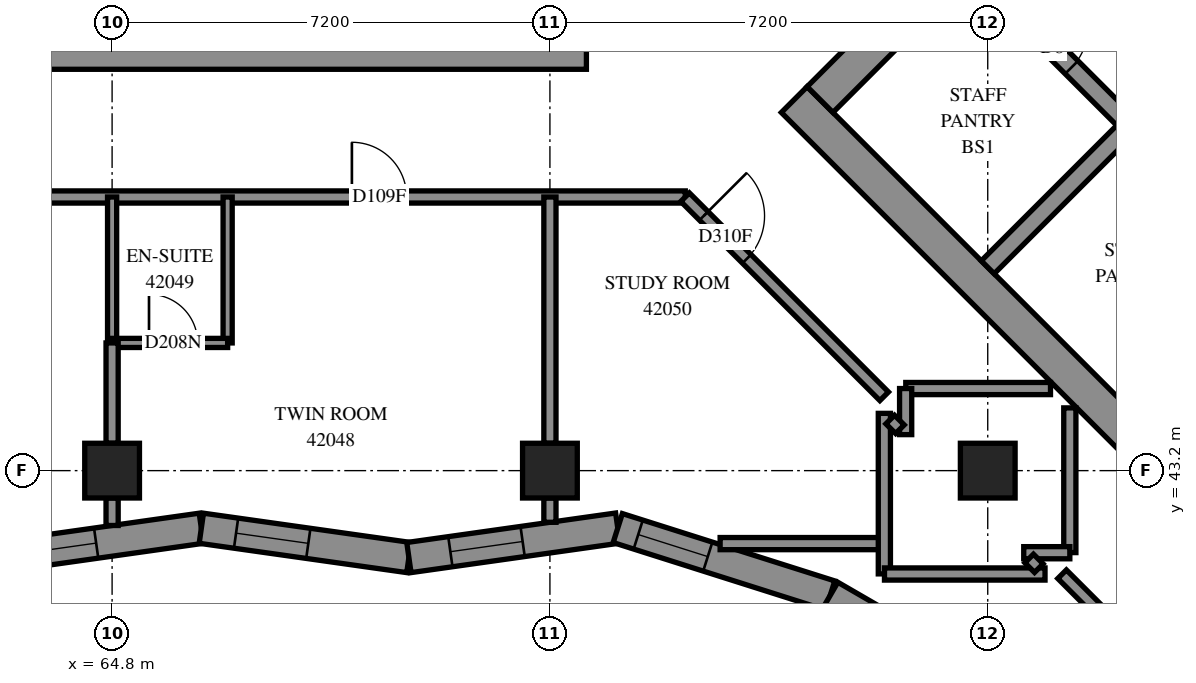
"""IFC4 building model, lengths in metres.
Left out: names, types, materials, properties, quantities, classifications, styles, units other than length and angle.
Written with IfcOpenShell. Run it as: python <this file> out.ifc"""

import sys

from ifc_helpers import new_model, si_unit, direction, frame, frame_2d, origin, origin_2d, place, context, subcontext, project, spatial, polyline, rectangle, outline, extrude, element, fill, save


model = new_model("IFC4")
c1 = context("Model", 3, precision=1e-05, world=origin(), true_north=direction((0.0, 1.0)))
c2 = subcontext(c1, "Body", "Model", "MODEL_VIEW")
j1 = project(units=[si_unit("LENGTHUNIT", "METRE"), si_unit("PLANEANGLEUNIT", "RADIAN")], contexts=[c1])
p1 = place(None, origin())
s1 = spatial("IfcSite", under=j1, at=p1, CompositionType="ELEMENT")
p2 = place(p1, origin())
s2 = spatial("IfcBuilding", under=s1, at=p2, CompositionType="ELEMENT")
p3 = place(p2, frame((0.0, 0.0, 155.8)))
s3 = spatial("IfcBuildingStorey", under=s2, at=p3, CompositionType="ELEMENT", Elevation=155.8)
for number, where, z_axis, x_axis in (
    (1, (64.8, 43.2, 0.0), (0.0, 0.0, 1.0), (1.0, 0.0, 0.0)),
    (2, (72.0, 43.2, 0.0), (0.0, 0.0, 1.0), (1.0, 0.0, 0.0)),
    (3, (79.2, 43.2, 0.0), (0.0, 0.0, 1.0), (1.0, 0.0, 0.0)),
):
    element("IfcColumn", number, at=place(p3, frame(where, z_axis=z_axis, x_axis=x_axis)), inside=s3, PredefinedType="COLUMN", context=c2, shape_type="SweptSolid", body=[
        extrude(rectangle(XDim=0.9, YDim=0.9, at=origin_2d()), origin(), (0.0, 0.0, 1.0), 3.1),
    ])
for number, where, z_axis, x_axis in (
    (4, (57.0, 50.1, -0.3), (0.0, 0.0, 1.0), (1.0, 0.0, 0.0)),
    (5, (76.018, 49.302, -0.3), (0.0, 0.0, 1.0), (0.707, -0.707, 0.0)),
):
    element("IfcWall", number, at=place(p3, frame(where, z_axis=z_axis, x_axis=x_axis)), inside=s3, PredefinedType="SHEAR", context=c2, shape_type="SweptSolid", body=[
        extrude(rectangle(XDim=15.6, YDim=0.6, at=frame_2d((7.8, 0.0))), origin(), (0.0, 0.0, 1.0), 2.7),
    ])
p4 = place(p3, frame((76.442, 49.302, -0.3), z_axis=(0.0, 0.0, 1.0), x_axis=(0.7071067812, 0.7071067812, 0.0)))
e6 = element("IfcWall", 6, at=p4, inside=s3, PredefinedType="SHEAR", context=c2, shape_type="SweptSolid", body=[
    extrude(rectangle(XDim=14.4, YDim=0.6, at=frame_2d((7.2, 0.0))), origin(), (0.0, 0.0, 1.0), 2.7),
])
p5 = place(p4, frame((4.55, 0.0, 0.3)))
e7 = element("IfcOpeningElement", 7, at=p5, cuts=e6, PredefinedType="OPENING", context=c2, shape_type="SweptSolid", body=[
    extrude(rectangle(XDim=1.1, YDim=2.1, at=frame_2d((0.55, 1.05))), frame((0.0, 0.31, 0.0), z_axis=(0.0, -1.0, 0.0), x_axis=(1.0, 0.0, 0.0)), (0.0, 0.0, 1.0), 0.62),
])
p6 = place(p4, frame((11.35, 0.0, 0.3)))
e8 = element("IfcOpeningElement", 8, at=p6, cuts=e6, PredefinedType="OPENING", context=c2, shape_type="SweptSolid", body=[
    extrude(rectangle(XDim=1.1, YDim=2.1, at=frame_2d((0.55, 1.05))), frame((0.0, 0.31, 0.0), z_axis=(0.0, -1.0, 0.0), x_axis=(1.0, 0.0, 0.0)), (0.0, 0.0, 1.0), 0.62),
])
p7 = place(p3, frame((79.2, 46.544, 0.0), z_axis=(0.0, 0.0, 1.0), x_axis=(0.7071219326, 0.7070916295, 0.0)))
e9 = element("IfcWall", 9, at=p7, inside=s3, PredefinedType="SOLIDWALL", context=c2, shape_type="SweptSolid", body=[
    extrude(rectangle(XDim=3.3, YDim=0.3, at=frame_2d((1.65, 0.0))), origin(), (0.0, 0.0, 1.0), 3.1),
])
p8 = place(p3, frame((78.988, 51.423, 0.0), z_axis=(0.0, 0.0, 1.0), x_axis=(0.7071067812, -0.7071067812, 0.0)))
e10 = element("IfcWall", 10, at=p8, inside=s3, PredefinedType="SOLIDWALL", context=c2, shape_type="SweptSolid", body=[
    extrude(rectangle(XDim=14.4, YDim=0.3, at=frame_2d((7.2, 0.0))), origin(), (0.0, 0.0, 1.0), 3.1),
])
p9 = place(p8, frame((1.35, 0.0, 0.0)))
e11 = element("IfcOpeningElement", 11, at=p9, cuts=e10, PredefinedType="OPENING", context=c2, shape_type="SweptSolid", body=[
    extrude(rectangle(XDim=0.9, YDim=2.1, at=frame_2d((0.45, 1.05))), frame((0.0, 0.16, 0.0), z_axis=(0.0, -1.0, 0.0), x_axis=(1.0, 0.0, 0.0)), (0.0, 0.0, 1.0), 0.32),
])
p10 = place(p8, frame((4.95, 0.0, 0.0)))
e12 = element("IfcOpeningElement", 12, at=p10, cuts=e10, PredefinedType="OPENING", context=c2, shape_type="SweptSolid", body=[
    extrude(rectangle(XDim=0.9, YDim=2.1, at=frame_2d((0.45, 1.05))), frame((0.0, 0.16, 0.0), z_axis=(0.0, -1.0, 0.0), x_axis=(1.0, 0.0, 0.0)), (0.0, 0.0, 1.0), 0.32),
])
p11 = place(p8, frame((8.55, 0.0, 0.0)))
e13 = element("IfcOpeningElement", 13, at=p11, cuts=e10, PredefinedType="OPENING", context=c2, shape_type="SweptSolid", body=[
    extrude(rectangle(XDim=0.9, YDim=2.1, at=frame_2d((0.45, 1.05))), frame((0.0, 0.16, 0.0), z_axis=(0.0, -1.0, 0.0), x_axis=(1.0, 0.0, 0.0)), (0.0, 0.0, 1.0), 0.32),
])
p12 = place(p8, frame((12.05, 0.0, 0.0)))
e14 = element("IfcOpeningElement", 14, at=p12, cuts=e10, PredefinedType="OPENING", context=c2, shape_type="SweptSolid", body=[
    extrude(rectangle(XDim=1.1, YDim=2.1, at=frame_2d((0.55, 1.05))), frame((0.0, 0.16, 0.0), z_axis=(0.0, -1.0, 0.0), x_axis=(1.0, 0.0, 0.0)), (0.0, 0.0, 1.0), 0.32),
])
p13 = place(p3, frame((62.854, 41.77, 0.0), z_axis=(0.0, 0.0, 1.0), x_axis=(0.9901767876, 0.1398210616, 0.0)))
e15 = element("IfcWall", 15, at=p13, inside=s3, PredefinedType="SOLIDWALL", context=c2, shape_type="SweptSolid", body=[
    extrude(outline(polyline([(-0.035, -0.25), (3.412, -0.25), (3.483, 0.25), (0.035, 0.25), (-0.035, -0.25)])), origin(), (0.0, 0.0, 1.0), 3.1),
])
p14 = place(p13, frame((0.5, 0.0, 0.45)))
e16 = element("IfcOpeningElement", 16, at=p14, cuts=e15, PredefinedType="OPENING", context=c2, shape_type="SweptSolid", body=[
    extrude(rectangle(XDim=1.2, YDim=2.5, at=frame_2d((0.6, 1.25))), frame((0.0, 0.26, 0.0), z_axis=(0.0, -1.0, 0.0), x_axis=(1.0, 0.0, 0.0)), (0.0, 0.0, 1.0), 0.52),
])
p15 = place(p3, frame((66.267, 42.252, 0.0), z_axis=(0.0, 0.0, 1.0), x_axis=(0.9901773547, -0.1398170455, 0.0)))
e17 = element("IfcWall", 17, at=p15, inside=s3, PredefinedType="SOLIDWALL", context=c2, shape_type="SweptSolid", body=[
    extrude(outline(polyline([(0.035, -0.25), (3.483, -0.25), (3.412, 0.25), (-0.035, 0.25), (0.035, -0.25)])), origin(), (0.0, 0.0, 1.0), 3.1),
])
p16 = place(p15, frame((0.577, 0.0, 0.45)))
e18 = element("IfcOpeningElement", 18, at=p16, cuts=e17, PredefinedType="OPENING", context=c2, shape_type="SweptSolid", body=[
    extrude(rectangle(XDim=1.2, YDim=2.5, at=frame_2d((0.6, 1.25))), frame((0.0, 0.26, 0.0), z_axis=(0.0, -1.0, 0.0), x_axis=(1.0, 0.0, 0.0)), (0.0, 0.0, 1.0), 0.52),
])
p17 = place(p3, frame((69.681, 41.77, 0.0), z_axis=(0.0, 0.0, 1.0), x_axis=(0.9901776599, 0.1398148844, 0.0)))
e19 = element("IfcWall", 19, at=p17, inside=s3, PredefinedType="SOLIDWALL", context=c2, shape_type="SweptSolid", body=[
    extrude(outline(polyline([(-0.035, -0.25), (3.412, -0.25), (3.526, 0.25), (0.035, 0.25), (-0.035, -0.25)])), origin(), (0.0, 0.0, 1.0), 3.1),
])
p18 = place(p17, frame((0.689, 0.0, 0.45)))
e20 = element("IfcOpeningElement", 20, at=p18, cuts=e19, PredefinedType="OPENING", context=c2, shape_type="SweptSolid", body=[
    extrude(rectangle(XDim=1.2, YDim=2.5, at=frame_2d((0.6, 1.25))), frame((0.0, 0.26, 0.0), z_axis=(0.0, -1.0, 0.0), x_axis=(1.0, 0.0, 0.0)), (0.0, 0.0, 1.0), 0.52),
])
p19 = place(p3, frame((73.116, 42.255, 0.0), z_axis=(0.0, 0.0, 1.0), x_axis=(0.9532588183, -0.3021549691, 0.0)))
e21 = element("IfcWall", 21, at=p19, inside=s3, PredefinedType="SOLIDWALL", context=c2, shape_type="SweptSolid", body=[
    extrude(outline(polyline([(0.057, -0.25), (3.638, -0.25), (3.692, 0.25), (-0.057, 0.25), (0.057, -0.25)])), origin(), (0.0, 0.0, 1.0), 3.1),
])
p20 = place(p19, frame((0.353, 0.0, 0.45)))
e22 = element("IfcOpeningElement", 22, at=p20, cuts=e21, PredefinedType="OPENING", context=c2, shape_type="SweptSolid", body=[
    extrude(rectangle(XDim=1.2, YDim=2.5, at=frame_2d((0.6, 1.25))), frame((0.0, 0.26, 0.0), z_axis=(0.0, -1.0, 0.0), x_axis=(1.0, 0.0, 0.0)), (0.0, 0.0, 1.0), 0.52),
])
p21 = place(p3, frame((76.609, 41.148, 0.0), z_axis=(0.0, 0.0, 1.0), x_axis=(0.8655245779, -0.5008664544, 0.0)))
e23 = element("IfcWall", 23, at=p21, inside=s3, PredefinedType="SOLIDWALL", context=c2, shape_type="SweptSolid", body=[
    extrude(outline(polyline([(0.027, -0.25), (4.223, -0.25), (4.319, 0.25), (-0.027, 0.25), (0.027, -0.25)])), origin(), (0.0, 0.0, 1.0), 3.1),
])
p22 = place(p21, frame((0.736, 0.0, 0.45)))
e24 = element("IfcOpeningElement", 24, at=p22, cuts=e23, PredefinedType="OPENING", context=c2, shape_type="SweptSolid", body=[
    extrude(rectangle(XDim=1.2, YDim=2.5, at=frame_2d((0.6, 1.25))), frame((0.0, 0.26, 0.0), z_axis=(0.0, -1.0, 0.0), x_axis=(1.0, 0.0, 0.0)), (0.0, 0.0, 1.0), 0.52),
])
p23 = place(p21, frame((2.272, 0.0, 0.45)))
e25 = element("IfcOpeningElement", 25, at=p23, cuts=e23, PredefinedType="OPENING", context=c2, shape_type="SweptSolid", body=[
    extrude(rectangle(XDim=1.2, YDim=2.5, at=frame_2d((0.6, 1.25))), frame((0.0, 0.26, 0.0), z_axis=(0.0, -1.0, 0.0), x_axis=(1.0, 0.0, 0.0)), (0.0, 0.0, 1.0), 0.52),
])
p24 = place(p3, frame((54.9, 47.7, 0.0), z_axis=(0.0, 0.0, 1.0), x_axis=(1.0, 0.0, 0.0)))
e26 = element("IfcWall", 26, at=p24, inside=s3, PredefinedType="PARTITIONING", context=c2, shape_type="SweptSolid", body=[
    extrude(rectangle(XDim=19.326, YDim=0.2, at=frame_2d((9.663, 0.0))), origin(), (0.0, 0.0, 1.0), 3.1),
])
p25 = place(p24, frame((6.643, 0.0, 0.0)))
e27 = element("IfcOpeningElement", 27, at=p25, cuts=e26, PredefinedType="OPENING", context=c2, shape_type="SweptSolid", body=[
    extrude(rectangle(XDim=0.9, YDim=2.1, at=frame_2d((0.45, 1.05))), frame((0.0, 0.11, 0.0), z_axis=(0.0, -1.0, 0.0), x_axis=(1.0, 0.0, 0.0)), (0.0, 0.0, 1.0), 0.22),
])
p26 = place(p24, frame((13.843, 0.0, 0.0)))
e28 = element("IfcOpeningElement", 28, at=p26, cuts=e26, PredefinedType="OPENING", context=c2, shape_type="SweptSolid", body=[
    extrude(rectangle(XDim=0.9, YDim=2.1, at=frame_2d((0.45, 1.05))), frame((0.0, 0.11, 0.0), z_axis=(0.0, -1.0, 0.0), x_axis=(1.0, 0.0, 0.0)), (0.0, 0.0, 1.0), 0.22),
])
p27 = place(p3, frame((80.423, 41.497, 0.0), z_axis=(0.0, 0.0, 1.0), x_axis=(0.7071067812, -0.7071067812, 0.0)))
e29 = element("IfcWall", 29, at=p27, inside=s3, PredefinedType="PARTITIONING", context=c2, shape_type="SweptSolid", body=[
    extrude(rectangle(XDim=9.065, YDim=0.2, at=frame_2d((4.532, 0.0))), origin(), (0.0, 0.0, 1.0), 3.1),
])
p28 = place(p3, frame((74.223, 47.697, 0.0), z_axis=(0.0, 0.0, 1.0), x_axis=(0.7071067812, -0.7071067812, 0.0)))
e30 = element("IfcWall", 30, at=p28, inside=s3, PredefinedType="PARTITIONING", context=c2, shape_type="SweptSolid", body=[
    extrude(rectangle(XDim=4.63, YDim=0.2, at=frame_2d((2.315, 0.0))), origin(), (0.0, 0.0, 1.0), 3.1),
])
p29 = place(p28, frame((0.434, 0.0, 0.0)))
e31 = element("IfcOpeningElement", 31, at=p29, cuts=e30, PredefinedType="OPENING", context=c2, shape_type="SweptSolid", body=[
    extrude(rectangle(XDim=1.0, YDim=2.1, at=frame_2d((0.5, 1.05))), frame((0.0, 0.11, 0.0), z_axis=(0.0, -1.0, 0.0), x_axis=(1.0, 0.0, 0.0)), (0.0, 0.0, 1.0), 0.22),
])
p30 = place(p3, frame((72.0, 43.65, 0.0), z_axis=(0.0, 0.0, 1.0), x_axis=(0.0, 1.0, 0.0)))
e32 = element("IfcWall", 32, at=p30, inside=s3, PredefinedType="PARTITIONING", context=c2, shape_type="SweptSolid", body=[
    extrude(rectangle(XDim=4.05, YDim=0.2, at=frame_2d((2.025, 0.0))), origin(), (0.0, 0.0, 1.0), 3.1),
])
p31 = place(p3, frame((74.799, 42.0, 0.0), z_axis=(0.0, 0.0, 1.0), x_axis=(1.0, 0.0, 0.0)))
e33 = element("IfcWall", 33, at=p31, inside=s3, PredefinedType="PARTITIONING", context=c2, shape_type="SweptSolid", body=[
    extrude(rectangle(XDim=2.701, YDim=0.2, at=frame_2d((1.351, 0.0))), origin(), (0.0, 0.0, 1.0), 3.1),
])
for number, where, z_axis, x_axis in (
    (34, (77.5, 41.502, 0.0), (0.0, 0.0, 1.0), (0.0, 1.0, 0.0)),
    (35, (77.502, 41.5, 0.0), (0.0, 0.0, 1.0), (1.0, 0.0, 0.0)),
):
    element("IfcWall", number, at=place(p3, frame(where, z_axis=z_axis, x_axis=x_axis)), inside=s3, PredefinedType="PARTITIONING", context=c2, shape_type="SweptSolid", body=[
        extrude(rectangle(XDim=2.64, YDim=0.2, at=frame_2d((1.32, 0.0))), origin(), (0.0, 0.0, 1.0), 3.1),
    ])
for number, where, z_axis, x_axis in (
    (36, (66.7, 45.3, 0.0), (0.0, 0.0, 1.0), (0.0, 1.0, 0.0)),
    (37, (64.8, 45.3, 0.0), (0.0, 0.0, 1.0), (0.0, 1.0, 0.0)),
):
    element("IfcWall", number, at=place(p3, frame(where, z_axis=z_axis, x_axis=x_axis)), inside=s3, PredefinedType="PARTITIONING", context=c2, shape_type="SweptSolid", body=[
        extrude(rectangle(XDim=2.4, YDim=0.15, at=frame_2d((1.2, 0.0))), origin(), (0.0, 0.0, 1.0), 3.1),
    ])
for number, where, z_axis, x_axis in (
    (38, (80.55, 41.852, 0.0), (0.0, 0.0, 1.0), (0.0, 1.0, 0.0)),
    (39, (77.852, 44.55, 0.0), (0.0, 0.0, 1.0), (1.0, 0.0, 0.0)),
):
    element("IfcWall", number, at=place(p3, frame(where, z_axis=z_axis, x_axis=x_axis)), inside=s3, PredefinedType="PARTITIONING", context=c2, shape_type="SweptSolid", body=[
        extrude(rectangle(XDim=2.38, YDim=0.2, at=frame_2d((1.19, 0.0))), origin(), (0.0, 0.0, 1.0), 3.1),
    ])
p32 = place(p3, frame((64.8, 45.3, 0.0), z_axis=(0.0, 0.0, 1.0), x_axis=(1.0, 0.0, 0.0)))
e40 = element("IfcWall", 40, at=p32, inside=s3, PredefinedType="PARTITIONING", context=c2, shape_type="SweptSolid", body=[
    extrude(rectangle(XDim=1.9, YDim=0.15, at=frame_2d((0.95, 0.0))), origin(), (0.0, 0.0, 1.0), 3.1),
])
p33 = place(p32, frame((0.607, 0.0, 0.0)))
e41 = element("IfcOpeningElement", 41, at=p33, cuts=e40, PredefinedType="OPENING", context=c2, shape_type="SweptSolid", body=[
    extrude(rectangle(XDim=0.8, YDim=2.1, at=frame_2d((0.4, 1.05))), frame((0.0, 0.085, 0.0), z_axis=(0.0, -1.0, 0.0), x_axis=(1.0, 0.0, 0.0)), (0.0, 0.0, 1.0), 0.17),
])
p34 = place(p3, frame((64.8, 43.65, 0.0), z_axis=(0.0, 0.0, 1.0), x_axis=(0.0, 1.0, 0.0)))
e42 = element("IfcWall", 42, at=p34, inside=s3, PredefinedType="PARTITIONING", context=c2, shape_type="SweptSolid", body=[
    extrude(rectangle(XDim=1.65, YDim=0.2, at=frame_2d((0.825, 0.0))), origin(), (0.0, 0.0, 1.0), 3.1),
])
for number, where, z_axis, x_axis in (
    (43, (77.85, 43.792, 0.0), (0.0, 0.0, 1.0), (0.0, 1.0, 0.0)),
    (44, (79.792, 41.85, 0.0), (0.0, 0.0, 1.0), (1.0, 0.0, 0.0)),
):
    element("IfcWall", number, at=place(p3, frame(where, z_axis=z_axis, x_axis=x_axis)), inside=s3, PredefinedType="PARTITIONING", context=c2, shape_type="SweptSolid", body=[
        extrude(rectangle(XDim=0.758, YDim=0.2, at=frame_2d((0.379, 0.0))), origin(), (0.0, 0.0, 1.0), 3.1),
    ])
for number, where, z_axis, x_axis in (
    (45, (79.881, 41.755, 0.0), (0.0, 0.0, 1.0), (0.707, -0.707, 0.0)),
    (46, (77.596, 44.04, 0.0), (0.0, 0.0, 1.0), (0.707, -0.707, 0.0)),
):
    element("IfcWall", number, at=place(p3, frame(where, z_axis=z_axis, x_axis=x_axis)), inside=s3, PredefinedType="PARTITIONING", context=c2, shape_type="SweptSolid", body=[
        extrude(rectangle(XDim=0.225, YDim=0.2, at=frame_2d((0.113, 0.0))), origin(), (0.0, 0.0, 1.0), 3.1),
    ])
p35 = place(p3, frame((64.8, 42.298, 0.0), z_axis=(0.0, 0.0, 1.0), x_axis=(0.0, 1.0, 0.0)))
e47 = element("IfcWall", 47, at=p35, inside=s3, PredefinedType="PARTITIONING", context=c2, shape_type="SweptSolid", body=[
    extrude(rectangle(XDim=0.452, YDim=0.2, at=frame_2d((0.226, 0.0))), origin(), (0.0, 0.0, 1.0), 3.1),
])
p36 = place(p3, frame((72.0, 42.35, 0.0), z_axis=(0.0, 0.0, 1.0), x_axis=(0.0, 1.0, 0.0)))
e48 = element("IfcWall", 48, at=p36, inside=s3, PredefinedType="PARTITIONING", context=c2, shape_type="SweptSolid", body=[
    extrude(rectangle(XDim=0.4, YDim=0.2, at=frame_2d((0.2, 0.0))), origin(), (0.0, 0.0, 1.0), 3.1),
])
p37 = place(p14, origin())
e49 = element("IfcWindow", 49, at=p37, inside=s3, PartitioningType="SINGLE_PANEL", PredefinedType="WINDOW", context=c2, shape_type="SweptSolid", body=[
    extrude(rectangle(XDim=1.2, YDim=2.5, at=frame_2d((0.6, 1.25))), frame((0.0, 0.18, 0.0), z_axis=(0.0, -1.0, 0.0), x_axis=(1.0, 0.0, 0.0)), (0.0, 0.0, 1.0), 0.06),
])
fill(e16, e49)
p38 = place(p16, origin())
e50 = element("IfcWindow", 50, at=p38, inside=s3, PartitioningType="SINGLE_PANEL", PredefinedType="WINDOW", context=c2, shape_type="SweptSolid", body=[
    extrude(rectangle(XDim=1.2, YDim=2.5, at=frame_2d((0.6, 1.25))), frame((0.0, 0.18, 0.0), z_axis=(0.0, -1.0, 0.0), x_axis=(1.0, 0.0, 0.0)), (0.0, 0.0, 1.0), 0.06),
])
fill(e18, e50)
p39 = place(p18, origin())
e51 = element("IfcWindow", 51, at=p39, inside=s3, PartitioningType="SINGLE_PANEL", PredefinedType="WINDOW", context=c2, shape_type="SweptSolid", body=[
    extrude(rectangle(XDim=1.2, YDim=2.5, at=frame_2d((0.6, 1.25))), frame((0.0, 0.18, 0.0), z_axis=(0.0, -1.0, 0.0), x_axis=(1.0, 0.0, 0.0)), (0.0, 0.0, 1.0), 0.06),
])
fill(e20, e51)
p40 = place(p20, origin())
e52 = element("IfcWindow", 52, at=p40, inside=s3, PartitioningType="SINGLE_PANEL", PredefinedType="WINDOW", context=c2, shape_type="SweptSolid", body=[
    extrude(rectangle(XDim=1.2, YDim=2.5, at=frame_2d((0.6, 1.25))), frame((0.0, 0.18, 0.0), z_axis=(0.0, -1.0, 0.0), x_axis=(1.0, 0.0, 0.0)), (0.0, 0.0, 1.0), 0.06),
])
fill(e22, e52)
p41 = place(p9, origin())
e53 = element("IfcDoor", 53, at=p41, inside=s3, OperationType="SINGLE_SWING_LEFT", PredefinedType="DOOR", context=c2, shape_type="SweptSolid", body=[
    extrude(rectangle(XDim=0.9, YDim=2.1, at=frame_2d((0.45, 1.05))), frame((0.0, 0.025, 0.0), z_axis=(0.0, -1.0, 0.0), x_axis=(1.0, 0.0, 0.0)), (0.0, 0.0, 1.0), 0.05),
])
fill(e11, e53)
p42 = place(p26, origin())
e54 = element("IfcDoor", 54, at=p42, inside=s3, OperationType="SINGLE_SWING_LEFT", PredefinedType="DOOR", context=c2, shape_type="SweptSolid", body=[
    extrude(rectangle(XDim=0.9, YDim=2.1, at=frame_2d((0.45, 1.05))), frame((0.0, 0.025, 0.0), z_axis=(0.0, -1.0, 0.0), x_axis=(1.0, 0.0, 0.0)), (0.0, 0.0, 1.0), 0.05),
])
fill(e28, e54)
p43 = place(p33, origin())
e55 = element("IfcDoor", 55, at=p43, inside=s3, OperationType="SINGLE_SWING_RIGHT", PredefinedType="DOOR", context=c2, shape_type="SweptSolid", body=[
    extrude(rectangle(XDim=0.8, YDim=2.1, at=frame_2d((0.4, 1.05))), frame((0.0, 0.025, 0.0), z_axis=(0.0, -1.0, 0.0), x_axis=(1.0, 0.0, 0.0)), (0.0, 0.0, 1.0), 0.05),
])
fill(e41, e55)
p44 = place(p29, origin())
e56 = element("IfcDoor", 56, at=p44, inside=s3, OperationType="SINGLE_SWING_LEFT", PredefinedType="DOOR", context=c2, shape_type="SweptSolid", body=[
    extrude(rectangle(XDim=1.0, YDim=2.1, at=frame_2d((0.5, 1.05))), frame((0.0, 0.025, 0.0), z_axis=(0.0, -1.0, 0.0), x_axis=(1.0, 0.0, 0.0)), (0.0, 0.0, 1.0), 0.05),
])
fill(e31, e56)
save(model, sys.argv[1])
